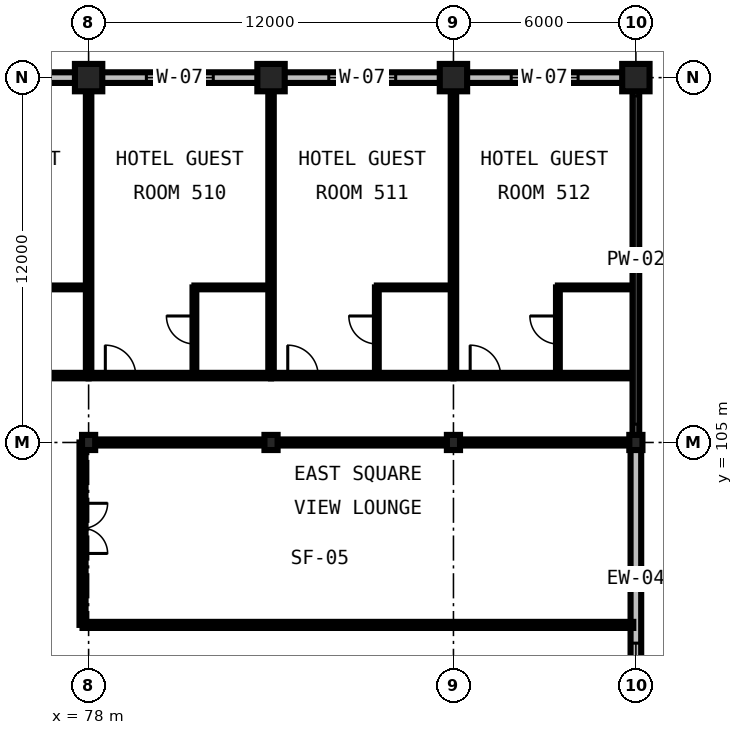
"""IFC4 building model, lengths in metres.
Left out: names, types, materials, properties, quantities, classifications, styles, units other than length and angle.
Written with IfcOpenShell. Run it as: python <this file> out.ifc"""

import sys

from ifc_helpers import new_model, si_unit, direction, frame, frame_2d, origin, origin_2d, place, context, subcontext, project, spatial, rectangle, i_section, extrude, element, fill, save


model = new_model("IFC4")
c1 = context("Model", 3, precision=1e-05, world=origin(), true_north=direction((0.0, 1.0)))
c2 = subcontext(c1, "Body", "Model", "MODEL_VIEW")
j1 = project(units=[si_unit("LENGTHUNIT", "METRE"), si_unit("PLANEANGLEUNIT", "RADIAN")], contexts=[c1])
p1 = place(None, origin())
s1 = spatial("IfcSite", under=j1, at=p1, CompositionType="ELEMENT")
p2 = place(p1, origin())
s2 = spatial("IfcBuilding", under=s1, at=p2, CompositionType="ELEMENT")
p3 = place(p2, frame((0.0, 0.0, 27.6)))
s3 = spatial("IfcBuildingStorey", under=s2, at=p3, CompositionType="ELEMENT", Elevation=27.6)
p4 = place(p3, frame((78.0, 105.0, 0.0), z_axis=(0.0, 0.0, 1.0), x_axis=(1.0, 0.0, 0.0)))
e1 = element("IfcColumn", 1, at=p4, inside=s3, PredefinedType="COLUMN", context=c2, shape_type="SweptSolid", body=[
    extrude(i_section(OverallWidth=0.432, OverallDepth=0.498, WebThickness=0.056, FlangeThickness=0.089, FilletRadius=0.031, at=origin_2d()), origin(), (0.0, 0.0, 1.0), 3.6),
])
p5 = place(p3, frame((78.0, 117.0, 0.0), z_axis=(0.0, 0.0, 1.0), x_axis=(1.0, 0.0, 0.0)))
e2 = element("IfcColumn", 2, at=p5, inside=s3, PredefinedType="COLUMN", context=c2, shape_type="SweptSolid", body=[
    extrude(rectangle(XDim=0.9, YDim=0.9, at=origin_2d()), origin(), (0.0, 0.0, 1.0), 3.6),
])
p6 = place(p3, frame((84.0, 105.0, 0.0), z_axis=(0.0, 0.0, 1.0), x_axis=(1.0, 0.0, 0.0)))
e3 = element("IfcColumn", 3, at=p6, inside=s3, PredefinedType="COLUMN", context=c2, shape_type="SweptSolid", body=[
    extrude(i_section(OverallWidth=0.432, OverallDepth=0.498, WebThickness=0.056, FlangeThickness=0.089, FilletRadius=0.031, at=origin_2d()), origin(), (0.0, 0.0, 1.0), 3.6),
])
p7 = place(p3, frame((84.0, 117.0, 0.0), z_axis=(0.0, 0.0, 1.0), x_axis=(1.0, 0.0, 0.0)))
e4 = element("IfcColumn", 4, at=p7, inside=s3, PredefinedType="COLUMN", context=c2, shape_type="SweptSolid", body=[
    extrude(rectangle(XDim=0.9, YDim=0.9, at=origin_2d()), origin(), (0.0, 0.0, 1.0), 3.6),
])
p8 = place(p3, frame((90.0, 105.0, 0.0), z_axis=(0.0, 0.0, 1.0), x_axis=(1.0, 0.0, 0.0)))
e5 = element("IfcColumn", 5, at=p8, inside=s3, PredefinedType="COLUMN", context=c2, shape_type="SweptSolid", body=[
    extrude(i_section(OverallWidth=0.432, OverallDepth=0.498, WebThickness=0.056, FlangeThickness=0.089, FilletRadius=0.031, at=origin_2d()), origin(), (0.0, 0.0, 1.0), 3.6),
])
p9 = place(p3, frame((90.0, 117.0, 0.0), z_axis=(0.0, 0.0, 1.0), x_axis=(1.0, 0.0, 0.0)))
e6 = element("IfcColumn", 6, at=p9, inside=s3, PredefinedType="COLUMN", context=c2, shape_type="SweptSolid", body=[
    extrude(rectangle(XDim=0.9, YDim=0.9, at=origin_2d()), origin(), (0.0, 0.0, 1.0), 3.6),
])
p10 = place(p3, frame((96.0, 105.0, 0.0), z_axis=(0.0, 0.0, 1.0), x_axis=(1.0, 0.0, 0.0)))
e7 = element("IfcColumn", 7, at=p10, inside=s3, PredefinedType="COLUMN", context=c2, shape_type="SweptSolid", body=[
    extrude(i_section(OverallWidth=0.432, OverallDepth=0.498, WebThickness=0.056, FlangeThickness=0.089, FilletRadius=0.031, at=origin_2d()), origin(), (0.0, 0.0, 1.0), 3.6),
])
p11 = place(p3, frame((96.0, 117.0, 0.0), z_axis=(0.0, 0.0, 1.0), x_axis=(1.0, 0.0, 0.0)))
e8 = element("IfcColumn", 8, at=p11, inside=s3, PredefinedType="COLUMN", context=c2, shape_type="SweptSolid", body=[
    extrude(rectangle(XDim=0.9, YDim=0.9, at=origin_2d()), origin(), (0.0, 0.0, 1.0), 3.6),
])
p12 = place(p3, frame((78.0, 117.0, 0.0), z_axis=(0.0, 0.0, 1.0), x_axis=(-1.0, 0.0, 0.0)))
e9 = element("IfcWall", 9, at=p12, inside=s3, PredefinedType="STANDARD", context=c2, shape_type="SweptSolid", body=[
    extrude(rectangle(XDim=12.0, YDim=0.35, at=frame_2d((6.0, 0.0))), origin(), (0.0, 0.0, 1.0), 2.486),
])
p13 = place(p12, frame((1.9, 0.0, 0.75)))
e10 = element("IfcOpeningElement", 10, at=p13, cuts=e9, PredefinedType="OPENING", context=c2, shape_type="SweptSolid", body=[
    extrude(rectangle(XDim=2.2, YDim=1.6, at=frame_2d((1.1, 0.8))), frame((0.0, 0.19, 0.0), z_axis=(0.0, -1.0, 0.0), x_axis=(1.0, 0.0, 0.0)), (0.0, 0.0, 1.0), 0.38),
])
p14 = place(p12, frame((7.825, 0.0, 0.75)))
e11 = element("IfcOpeningElement", 11, at=p14, cuts=e9, PredefinedType="OPENING", context=c2, shape_type="SweptSolid", body=[
    extrude(rectangle(XDim=2.35, YDim=1.6, at=frame_2d((1.175, 0.8))), frame((0.0, 0.19, 0.0), z_axis=(0.0, -1.0, 0.0), x_axis=(1.0, 0.0, 0.0)), (0.0, 0.0, 1.0), 0.38),
])
p15 = place(p3, frame((84.0, 117.0, 0.0), z_axis=(0.0, 0.0, 1.0), x_axis=(-1.0, 0.0, 0.0)))
e12 = element("IfcWall", 12, at=p15, inside=s3, PredefinedType="STANDARD", context=c2, shape_type="SweptSolid", body=[
    extrude(rectangle(XDim=6.0, YDim=0.35, at=frame_2d((3.0, 0.0))), origin(), (0.0, 0.0, 1.0), 2.486),
])
p16 = place(p15, frame((1.9, 0.0, 0.75)))
e13 = element("IfcOpeningElement", 13, at=p16, cuts=e12, PredefinedType="OPENING", context=c2, shape_type="SweptSolid", body=[
    extrude(rectangle(XDim=2.2, YDim=1.6, at=frame_2d((1.1, 0.8))), frame((0.0, 0.19, 0.0), z_axis=(0.0, -1.0, 0.0), x_axis=(1.0, 0.0, 0.0)), (0.0, 0.0, 1.0), 0.38),
])
p17 = place(p3, frame((90.0, 117.0, 0.0), z_axis=(0.0, 0.0, 1.0), x_axis=(-1.0, 0.0, 0.0)))
e14 = element("IfcWall", 14, at=p17, inside=s3, PredefinedType="STANDARD", context=c2, shape_type="SweptSolid", body=[
    extrude(rectangle(XDim=6.0, YDim=0.35, at=frame_2d((3.0, 0.0))), origin(), (0.0, 0.0, 1.0), 2.486),
])
p18 = place(p17, frame((1.9, 0.0, 0.75)))
e15 = element("IfcOpeningElement", 15, at=p18, cuts=e14, PredefinedType="OPENING", context=c2, shape_type="SweptSolid", body=[
    extrude(rectangle(XDim=2.2, YDim=1.6, at=frame_2d((1.1, 0.8))), frame((0.0, 0.19, 0.0), z_axis=(0.0, -1.0, 0.0), x_axis=(1.0, 0.0, 0.0)), (0.0, 0.0, 1.0), 0.38),
])
p19 = place(p3, frame((96.0, 117.0, 0.0), z_axis=(0.0, 0.0, 1.0), x_axis=(-1.0, 0.0, 0.0)))
e16 = element("IfcWall", 16, at=p19, inside=s3, PredefinedType="STANDARD", context=c2, shape_type="SweptSolid", body=[
    extrude(rectangle(XDim=6.0, YDim=0.35, at=frame_2d((3.0, 0.0))), origin(), (0.0, 0.0, 1.0), 2.486),
])
p20 = place(p19, frame((1.9, 0.0, 0.75)))
e17 = element("IfcOpeningElement", 17, at=p20, cuts=e16, PredefinedType="OPENING", context=c2, shape_type="SweptSolid", body=[
    extrude(rectangle(XDim=2.2, YDim=1.6, at=frame_2d((1.1, 0.8))), frame((0.0, 0.19, 0.0), z_axis=(0.0, -1.0, 0.0), x_axis=(1.0, 0.0, 0.0)), (0.0, 0.0, 1.0), 0.38),
])
p21 = place(p3, frame((96.0, 96.0, 0.0), z_axis=(0.0, 0.0, 1.0), x_axis=(0.0, 1.0, 0.0)))
e18 = element("IfcWall", 18, at=p21, inside=s3, PredefinedType="STANDARD", context=c2, shape_type="SweptSolid", body=[
    extrude(rectangle(XDim=9.0, YDim=0.35, at=frame_2d((4.5, 0.0))), origin(), (0.0, 0.0, 1.0), 2.981),
])
p22 = place(p21, frame((0.6, 0.0, 0.85)))
e19 = element("IfcOpeningElement", 19, at=p22, cuts=e18, PredefinedType="OPENING", context=c2, shape_type="SweptSolid", body=[
    extrude(rectangle(XDim=1.8, YDim=1.5, at=frame_2d((0.9, 0.75))), frame((0.0, 0.19, 0.0), z_axis=(0.0, -1.0, 0.0), x_axis=(1.0, 0.0, 0.0)), (0.0, 0.0, 1.0), 0.38),
])
p23 = place(p3, frame((96.0, 105.0, 0.0), z_axis=(0.0, 0.0, 1.0), x_axis=(0.0, 1.0, 0.0)))
e20 = element("IfcWall", 20, at=p23, inside=s3, PredefinedType="PARAPET", context=c2, shape_type="SweptSolid", body=[
    extrude(rectangle(XDim=12.0, YDim=0.22, at=frame_2d((6.0, 0.0))), origin(), (0.0, 0.0, 1.0), 0.2),
])
p24 = place(p3, frame((72.0, 107.2, 0.0), z_axis=(0.0, 0.0, 1.0), x_axis=(1.0, 0.0, 0.0)))
e21 = element("IfcWall", 21, at=p24, inside=s3, PredefinedType="PARTITIONING", context=c2, shape_type="SweptSolid", body=[
    extrude(rectangle(XDim=6.0, YDim=0.18, at=frame_2d((3.0, 0.0))), origin(), (0.0, 0.0, 1.0), 3.29),
])
p25 = place(p24, frame((0.55, 0.0, 0.0)))
e22 = element("IfcOpeningElement", 22, at=p25, cuts=e21, PredefinedType="OPENING", context=c2, shape_type="SweptSolid", body=[
    extrude(rectangle(XDim=1.0, YDim=2.15, at=frame_2d((0.5, 1.075))), frame((0.0, 0.105, 0.0), z_axis=(0.0, -1.0, 0.0), x_axis=(1.0, 0.0, 0.0)), (0.0, 0.0, 1.0), 0.21),
])
p26 = place(p3, frame((78.0, 107.2, 0.0), z_axis=(0.0, 0.0, 1.0), x_axis=(0.0, 1.0, 0.0)))
e23 = element("IfcWall", 23, at=p26, inside=s3, PredefinedType="PARTITIONING", context=c2, shape_type="SweptSolid", body=[
    extrude(rectangle(XDim=9.625, YDim=0.18, at=frame_2d((4.812, 0.0))), origin(), (0.0, 0.0, 1.0), 2.59),
])
p27 = place(p3, frame((75.48, 110.1, 0.0), z_axis=(0.0, 0.0, 1.0), x_axis=(1.0, 0.0, 0.0)))
e24 = element("IfcWall", 24, at=p27, inside=s3, PredefinedType="PARTITIONING", context=c2, shape_type="SweptSolid", body=[
    extrude(rectangle(XDim=2.52, YDim=0.125, at=frame_2d((1.26, 0.0))), origin(), (0.0, 0.0, 1.0), 3.29),
])
p28 = place(p3, frame((78.0, 107.2, 0.0), z_axis=(0.0, 0.0, 1.0), x_axis=(1.0, 0.0, 0.0)))
e25 = element("IfcWall", 25, at=p28, inside=s3, PredefinedType="PARTITIONING", context=c2, shape_type="SweptSolid", body=[
    extrude(rectangle(XDim=6.0, YDim=0.18, at=frame_2d((3.0, 0.0))), origin(), (0.0, 0.0, 1.0), 3.29),
])
p29 = place(p28, frame((0.55, 0.0, 0.0)))
e26 = element("IfcOpeningElement", 26, at=p29, cuts=e25, PredefinedType="OPENING", context=c2, shape_type="SweptSolid", body=[
    extrude(rectangle(XDim=1.0, YDim=2.15, at=frame_2d((0.5, 1.075))), frame((0.0, 0.105, 0.0), z_axis=(0.0, -1.0, 0.0), x_axis=(1.0, 0.0, 0.0)), (0.0, 0.0, 1.0), 0.21),
])
p30 = place(p3, frame((84.0, 107.2, 0.0), z_axis=(0.0, 0.0, 1.0), x_axis=(0.0, 1.0, 0.0)))
e27 = element("IfcWall", 27, at=p30, inside=s3, PredefinedType="PARTITIONING", context=c2, shape_type="SweptSolid", body=[
    extrude(rectangle(XDim=9.625, YDim=0.18, at=frame_2d((4.812, 0.0))), origin(), (0.0, 0.0, 1.0), 2.59),
])
p31 = place(p3, frame((81.48, 107.29, 0.0), z_axis=(0.0, 0.0, 1.0), x_axis=(0.0, 1.0, 0.0)))
e28 = element("IfcWall", 28, at=p31, inside=s3, PredefinedType="PARTITIONING", context=c2, shape_type="SweptSolid", body=[
    extrude(rectangle(XDim=2.81, YDim=0.125, at=frame_2d((1.405, 0.0))), origin(), (0.0, 0.0, 1.0), 3.29),
])
p32 = place(p31, frame((0.95, 0.0, 0.0)))
e29 = element("IfcOpeningElement", 29, at=p32, cuts=e28, PredefinedType="OPENING", context=c2, shape_type="SweptSolid", body=[
    extrude(rectangle(XDim=0.92, YDim=2.1, at=frame_2d((0.46, 1.05))), frame((0.0, 0.077, 0.0), z_axis=(0.0, -1.0, 0.0), x_axis=(1.0, 0.0, 0.0)), (0.0, 0.0, 1.0), 0.155),
])
p33 = place(p3, frame((81.48, 110.1, 0.0), z_axis=(0.0, 0.0, 1.0), x_axis=(1.0, 0.0, 0.0)))
e30 = element("IfcWall", 30, at=p33, inside=s3, PredefinedType="PARTITIONING", context=c2, shape_type="SweptSolid", body=[
    extrude(rectangle(XDim=2.52, YDim=0.125, at=frame_2d((1.26, 0.0))), origin(), (0.0, 0.0, 1.0), 3.29),
])
p34 = place(p3, frame((84.0, 107.2, 0.0), z_axis=(0.0, 0.0, 1.0), x_axis=(1.0, 0.0, 0.0)))
e31 = element("IfcWall", 31, at=p34, inside=s3, PredefinedType="PARTITIONING", context=c2, shape_type="SweptSolid", body=[
    extrude(rectangle(XDim=6.0, YDim=0.18, at=frame_2d((3.0, 0.0))), origin(), (0.0, 0.0, 1.0), 3.29),
])
p35 = place(p34, frame((0.55, 0.0, 0.0)))
e32 = element("IfcOpeningElement", 32, at=p35, cuts=e31, PredefinedType="OPENING", context=c2, shape_type="SweptSolid", body=[
    extrude(rectangle(XDim=1.0, YDim=2.15, at=frame_2d((0.5, 1.075))), frame((0.0, 0.105, 0.0), z_axis=(0.0, -1.0, 0.0), x_axis=(1.0, 0.0, 0.0)), (0.0, 0.0, 1.0), 0.21),
])
p36 = place(p3, frame((90.0, 107.2, 0.0), z_axis=(0.0, 0.0, 1.0), x_axis=(0.0, 1.0, 0.0)))
e33 = element("IfcWall", 33, at=p36, inside=s3, PredefinedType="PARTITIONING", context=c2, shape_type="SweptSolid", body=[
    extrude(rectangle(XDim=9.625, YDim=0.18, at=frame_2d((4.812, 0.0))), origin(), (0.0, 0.0, 1.0), 2.59),
])
p37 = place(p3, frame((87.48, 107.29, 0.0), z_axis=(0.0, 0.0, 1.0), x_axis=(0.0, 1.0, 0.0)))
e34 = element("IfcWall", 34, at=p37, inside=s3, PredefinedType="PARTITIONING", context=c2, shape_type="SweptSolid", body=[
    extrude(rectangle(XDim=2.81, YDim=0.125, at=frame_2d((1.405, 0.0))), origin(), (0.0, 0.0, 1.0), 3.29),
])
p38 = place(p37, frame((0.95, 0.0, 0.0)))
e35 = element("IfcOpeningElement", 35, at=p38, cuts=e34, PredefinedType="OPENING", context=c2, shape_type="SweptSolid", body=[
    extrude(rectangle(XDim=0.92, YDim=2.1, at=frame_2d((0.46, 1.05))), frame((0.0, 0.077, 0.0), z_axis=(0.0, -1.0, 0.0), x_axis=(1.0, 0.0, 0.0)), (0.0, 0.0, 1.0), 0.155),
])
p39 = place(p3, frame((87.48, 110.1, 0.0), z_axis=(0.0, 0.0, 1.0), x_axis=(1.0, 0.0, 0.0)))
e36 = element("IfcWall", 36, at=p39, inside=s3, PredefinedType="PARTITIONING", context=c2, shape_type="SweptSolid", body=[
    extrude(rectangle(XDim=2.52, YDim=0.125, at=frame_2d((1.26, 0.0))), origin(), (0.0, 0.0, 1.0), 3.29),
])
p40 = place(p3, frame((90.0, 107.2, 0.0), z_axis=(0.0, 0.0, 1.0), x_axis=(1.0, 0.0, 0.0)))
e37 = element("IfcWall", 37, at=p40, inside=s3, PredefinedType="PARTITIONING", context=c2, shape_type="SweptSolid", body=[
    extrude(rectangle(XDim=5.915, YDim=0.18, at=frame_2d((2.957, 0.0))), origin(), (0.0, 0.0, 1.0), 3.29),
])
p41 = place(p40, frame((0.55, 0.0, 0.0)))
e38 = element("IfcOpeningElement", 38, at=p41, cuts=e37, PredefinedType="OPENING", context=c2, shape_type="SweptSolid", body=[
    extrude(rectangle(XDim=1.0, YDim=2.15, at=frame_2d((0.5, 1.075))), frame((0.0, 0.105, 0.0), z_axis=(0.0, -1.0, 0.0), x_axis=(1.0, 0.0, 0.0)), (0.0, 0.0, 1.0), 0.21),
])
p42 = place(p3, frame((93.435, 107.29, 0.0), z_axis=(0.0, 0.0, 1.0), x_axis=(0.0, 1.0, 0.0)))
e39 = element("IfcWall", 39, at=p42, inside=s3, PredefinedType="PARTITIONING", context=c2, shape_type="SweptSolid", body=[
    extrude(rectangle(XDim=2.81, YDim=0.125, at=frame_2d((1.405, 0.0))), origin(), (0.0, 0.0, 1.0), 3.29),
])
p43 = place(p42, frame((0.95, 0.0, 0.0)))
e40 = element("IfcOpeningElement", 40, at=p43, cuts=e39, PredefinedType="OPENING", context=c2, shape_type="SweptSolid", body=[
    extrude(rectangle(XDim=0.92, YDim=2.1, at=frame_2d((0.46, 1.05))), frame((0.0, 0.077, 0.0), z_axis=(0.0, -1.0, 0.0), x_axis=(1.0, 0.0, 0.0)), (0.0, 0.0, 1.0), 0.155),
])
p44 = place(p3, frame((93.435, 110.1, 0.0), z_axis=(0.0, 0.0, 1.0), x_axis=(1.0, 0.0, 0.0)))
e41 = element("IfcWall", 41, at=p44, inside=s3, PredefinedType="PARTITIONING", context=c2, shape_type="SweptSolid", body=[
    extrude(rectangle(XDim=2.48, YDim=0.125, at=frame_2d((1.24, 0.0))), origin(), (0.0, 0.0, 1.0), 3.29),
])
p45 = place(p3, frame((77.8, 99.0, 0.0), z_axis=(0.0, 0.0, 1.0), x_axis=(1.0, 0.0, 0.0)))
e42 = element("IfcWall", 42, at=p45, inside=s3, PredefinedType="PARTITIONING", context=c2, shape_type="SweptSolid", body=[
    extrude(rectangle(XDim=18.115, YDim=0.2, at=frame_2d((9.057, 0.0))), origin(), (0.0, 0.0, 1.0), 3.29),
])
p46 = place(p3, frame((95.915, 105.0, 0.0), z_axis=(0.0, 0.0, 1.0), x_axis=(-1.0, 0.0, 0.0)))
e43 = element("IfcWall", 43, at=p46, inside=s3, PredefinedType="PARTITIONING", context=c2, shape_type="SweptSolid", body=[
    extrude(rectangle(XDim=18.115, YDim=0.2, at=frame_2d((9.057, 0.0))), origin(), (0.0, 0.0, 1.0), 2.736),
])
p47 = place(p3, frame((77.8, 105.0, 0.0), z_axis=(0.0, 0.0, 1.0), x_axis=(0.0, -1.0, 0.0)))
e44 = element("IfcWall", 44, at=p47, inside=s3, PredefinedType="PARTITIONING", context=c2, shape_type="SweptSolid", body=[
    extrude(rectangle(XDim=6.0, YDim=0.2, at=frame_2d((3.0, 0.0))), origin(), (0.0, 0.0, 1.0), 3.29),
])
p48 = place(p47, frame((2.0, 0.0, 0.0)))
e45 = element("IfcOpeningElement", 45, at=p48, cuts=e44, PredefinedType="OPENING", context=c2, shape_type="SweptSolid", body=[
    extrude(rectangle(XDim=1.65, YDim=2.25, at=frame_2d((0.825, 1.125))), frame((0.0, 0.115, 0.0), z_axis=(0.0, -1.0, 0.0), x_axis=(1.0, 0.0, 0.0)), (0.0, 0.0, 1.0), 0.23),
])
p49 = place(p16, origin())
e46 = element("IfcWindow", 46, at=p49, inside=s3, PartitioningType="DOUBLE_PANEL_VERTICAL", PredefinedType="WINDOW", context=c2, shape_type="SweptSolid", body=[
    extrude(rectangle(XDim=2.2, YDim=1.6, at=frame_2d((1.1, 0.8))), frame((0.0, 0.03, 0.0), z_axis=(0.0, -1.0, 0.0), x_axis=(1.0, 0.0, 0.0)), (0.0, 0.0, 1.0), 0.06),
])
fill(e13, e46)
p50 = place(p18, origin())
e47 = element("IfcWindow", 47, at=p50, inside=s3, PartitioningType="DOUBLE_PANEL_VERTICAL", PredefinedType="WINDOW", context=c2, shape_type="SweptSolid", body=[
    extrude(rectangle(XDim=2.2, YDim=1.6, at=frame_2d((1.1, 0.8))), frame((0.0, 0.03, 0.0), z_axis=(0.0, -1.0, 0.0), x_axis=(1.0, 0.0, 0.0)), (0.0, 0.0, 1.0), 0.06),
])
fill(e15, e47)
p51 = place(p20, origin())
e48 = element("IfcWindow", 48, at=p51, inside=s3, PartitioningType="DOUBLE_PANEL_VERTICAL", PredefinedType="WINDOW", context=c2, shape_type="SweptSolid", body=[
    extrude(rectangle(XDim=2.2, YDim=1.6, at=frame_2d((1.1, 0.8))), frame((0.0, 0.03, 0.0), z_axis=(0.0, -1.0, 0.0), x_axis=(1.0, 0.0, 0.0)), (0.0, 0.0, 1.0), 0.06),
])
fill(e17, e48)
p52 = place(p22, origin())
e49 = element("IfcWindow", 49, at=p52, inside=s3, PartitioningType="SINGLE_PANEL", PredefinedType="WINDOW", context=c2, shape_type="SweptSolid", body=[
    extrude(rectangle(XDim=1.8, YDim=1.5, at=frame_2d((0.9, 0.75))), frame((0.0, 0.03, 0.0), z_axis=(0.0, -1.0, 0.0), x_axis=(1.0, 0.0, 0.0)), (0.0, 0.0, 1.0), 0.06),
])
fill(e19, e49)
p53 = place(p29, origin())
e50 = element("IfcDoor", 50, at=p53, inside=s3, OperationType="SINGLE_SWING_LEFT", PredefinedType="DOOR", context=c2, shape_type="SweptSolid", body=[
    extrude(rectangle(XDim=1.0, YDim=2.15, at=frame_2d((0.5, 1.075))), frame((0.0, 0.025, 0.0), z_axis=(0.0, -1.0, 0.0), x_axis=(1.0, 0.0, 0.0)), (0.0, 0.0, 1.0), 0.05),
])
fill(e26, e50)
p54 = place(p32, origin())
e51 = element("IfcDoor", 51, at=p54, inside=s3, OperationType="SINGLE_SWING_RIGHT", PredefinedType="DOOR", context=c2, shape_type="SweptSolid", body=[
    extrude(rectangle(XDim=0.92, YDim=2.1, at=frame_2d((0.46, 1.05))), frame((0.0, 0.025, 0.0), z_axis=(0.0, -1.0, 0.0), x_axis=(1.0, 0.0, 0.0)), (0.0, 0.0, 1.0), 0.05),
])
fill(e29, e51)
p55 = place(p35, origin())
e52 = element("IfcDoor", 52, at=p55, inside=s3, OperationType="SINGLE_SWING_LEFT", PredefinedType="DOOR", context=c2, shape_type="SweptSolid", body=[
    extrude(rectangle(XDim=1.0, YDim=2.15, at=frame_2d((0.5, 1.075))), frame((0.0, 0.025, 0.0), z_axis=(0.0, -1.0, 0.0), x_axis=(1.0, 0.0, 0.0)), (0.0, 0.0, 1.0), 0.05),
])
fill(e32, e52)
p56 = place(p38, origin())
e53 = element("IfcDoor", 53, at=p56, inside=s3, OperationType="SINGLE_SWING_RIGHT", PredefinedType="DOOR", context=c2, shape_type="SweptSolid", body=[
    extrude(rectangle(XDim=0.92, YDim=2.1, at=frame_2d((0.46, 1.05))), frame((0.0, 0.025, 0.0), z_axis=(0.0, -1.0, 0.0), x_axis=(1.0, 0.0, 0.0)), (0.0, 0.0, 1.0), 0.05),
])
fill(e35, e53)
p57 = place(p41, origin())
e54 = element("IfcDoor", 54, at=p57, inside=s3, OperationType="SINGLE_SWING_LEFT", PredefinedType="DOOR", context=c2, shape_type="SweptSolid", body=[
    extrude(rectangle(XDim=1.0, YDim=2.15, at=frame_2d((0.5, 1.075))), frame((0.0, 0.025, 0.0), z_axis=(0.0, -1.0, 0.0), x_axis=(1.0, 0.0, 0.0)), (0.0, 0.0, 1.0), 0.05),
])
fill(e38, e54)
p58 = place(p43, origin())
e55 = element("IfcDoor", 55, at=p58, inside=s3, OperationType="SINGLE_SWING_RIGHT", PredefinedType="DOOR", context=c2, shape_type="SweptSolid", body=[
    extrude(rectangle(XDim=0.92, YDim=2.1, at=frame_2d((0.46, 1.05))), frame((0.0, 0.025, 0.0), z_axis=(0.0, -1.0, 0.0), x_axis=(1.0, 0.0, 0.0)), (0.0, 0.0, 1.0), 0.05),
])
fill(e40, e55)
p59 = place(p48, origin())
e56 = element("IfcDoor", 56, at=p59, inside=s3, OperationType="DOUBLE_DOOR_SINGLE_SWING", PredefinedType="DOOR", context=c2, shape_type="SweptSolid", body=[
    extrude(rectangle(XDim=1.65, YDim=2.25, at=frame_2d((0.825, 1.125))), frame((0.0, 0.025, 0.0), z_axis=(0.0, -1.0, 0.0), x_axis=(1.0, 0.0, 0.0)), (0.0, 0.0, 1.0), 0.05),
])
fill(e45, e56)
save(model, sys.argv[1])
